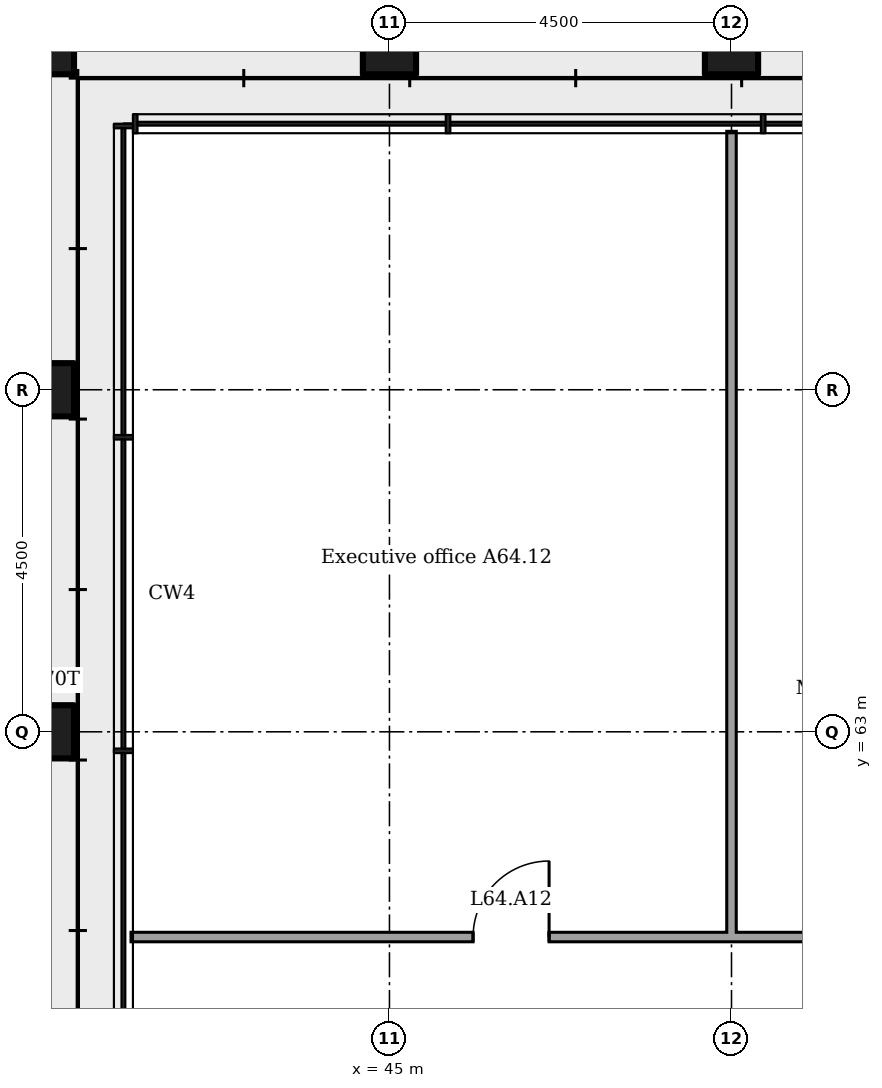
"""IFC4 building model, lengths in metres.
Left out: names, types, materials, properties, quantities, classifications, styles, units other than length and angle.
Written with IfcOpenShell. Run it as: python <this file> out.ifc"""

import sys

from ifc_helpers import new_model, si_unit, direction, frame, frame_2d, origin, origin_2d, place, context, subcontext, project, spatial, rectangle, extrude, element, fill, save


model = new_model("IFC4")
c1 = context("Model", 3, precision=1e-05, world=origin(), true_north=direction((0.0, 1.0)))
c2 = subcontext(c1, "Body", "Model", "MODEL_VIEW")
j1 = project(units=[si_unit("LENGTHUNIT", "METRE"), si_unit("PLANEANGLEUNIT", "RADIAN")], contexts=[c1])
p1 = place(None, origin())
s1 = spatial("IfcSite", under=j1, at=p1, CompositionType="ELEMENT")
p2 = place(p1, origin())
s2 = spatial("IfcBuilding", under=s1, at=p2, CompositionType="ELEMENT")
p3 = place(p2, frame((0.0, 0.0, 251.0)))
s3 = spatial("IfcBuildingStorey", under=s2, at=p3, CompositionType="ELEMENT", Elevation=251.0)
for number, where in (
    (1, (49.5, 72.0, 0.0)),
    (2, (45.0, 72.0, 0.0)),
    (3, (40.5, 72.0, 0.0)),
    (4, (40.5, 67.5, 0.0)),
    (5, (40.5, 63.0, 0.0)),
):
    element("IfcColumn", number, at=place(p3, frame(where)), inside=s3, PredefinedType="COLUMN", context=c2, shape_type="SweptSolid", body=[
        extrude(rectangle(XDim=0.7, YDim=0.7, at=origin_2d()), origin(), (0.0, 0.0, 1.0), 4.2),
    ])
p4 = place(p3, frame((41.6, 60.3, 0.0)))
e6 = element("IfcWall", 6, at=p4, inside=s3, PredefinedType="PARTITIONING", context=c2, shape_type="SweptSolid", body=[
    extrude(rectangle(XDim=20.262, YDim=0.125, at=frame_2d((10.131, 0.0))), origin(), (0.0, 0.0, 1.0), 4.025),
])
p5 = place(p4, frame((17.755, 0.0, 0.0)))
e7 = element("IfcOpeningElement", 7, at=p5, cuts=e6, PredefinedType="OPENING", context=c2, shape_type="SweptSolid", body=[
    extrude(rectangle(XDim=1.8, YDim=2.1, at=frame_2d((0.9, 1.05))), frame((0.0, 0.073, 0.0), z_axis=(0.0, -1.0, 0.0), x_axis=(1.0, 0.0, 0.0)), (0.0, 0.0, 1.0), 0.145),
])
p6 = place(p4, frame((14.15, 0.0, 0.0)))
e8 = element("IfcOpeningElement", 8, at=p6, cuts=e6, PredefinedType="OPENING", context=c2, shape_type="SweptSolid", body=[
    extrude(rectangle(XDim=1.0, YDim=2.1, at=frame_2d((0.5, 1.05))), frame((0.0, 0.073, 0.0), z_axis=(0.0, -1.0, 0.0), x_axis=(1.0, 0.0, 0.0)), (0.0, 0.0, 1.0), 0.145),
])
p7 = place(p4, frame((9.195, 0.0, 0.0)))
e9 = element("IfcOpeningElement", 9, at=p7, cuts=e6, PredefinedType="OPENING", context=c2, shape_type="SweptSolid", body=[
    extrude(rectangle(XDim=1.0, YDim=2.1, at=frame_2d((0.5, 1.05))), frame((0.0, 0.073, 0.0), z_axis=(0.0, -1.0, 0.0), x_axis=(1.0, 0.0, 0.0)), (0.0, 0.0, 1.0), 0.145),
])
p8 = place(p4, frame((4.5, 0.0, 0.0)))
e10 = element("IfcOpeningElement", 10, at=p8, cuts=e6, PredefinedType="OPENING", context=c2, shape_type="SweptSolid", body=[
    extrude(rectangle(XDim=1.0, YDim=2.1, at=frame_2d((0.5, 1.05))), frame((0.0, 0.073, 0.0), z_axis=(0.0, -1.0, 0.0), x_axis=(1.0, 0.0, 0.0)), (0.0, 0.0, 1.0), 0.145),
])
p9 = place(p3, frame((49.5, 60.3, 0.0), z_axis=(0.0, 0.0, 1.0), x_axis=(0.0, 1.0, 0.0)))
e11 = element("IfcWall", 11, at=p9, inside=s3, PredefinedType="PARTITIONING", context=c2, shape_type="SweptSolid", body=[
    extrude(rectangle(XDim=10.6, YDim=0.125, at=frame_2d((5.3, 0.0))), origin(), (0.0, 0.0, 1.0), 3.341),
])
p10 = place(p8, origin())
e12 = element("IfcDoor", 12, at=p10, inside=s3, OperationType="SINGLE_SWING_LEFT", PredefinedType="DOOR", context=c2, shape_type="SweptSolid", body=[
    extrude(rectangle(XDim=1.0, YDim=2.1, at=frame_2d((0.5, 1.05))), frame((0.0, 0.025, 0.0), z_axis=(0.0, -1.0, 0.0), x_axis=(1.0, 0.0, 0.0)), (0.0, 0.0, 1.0), 0.05),
])
fill(e10, e12)
save(model, sys.argv[1])
